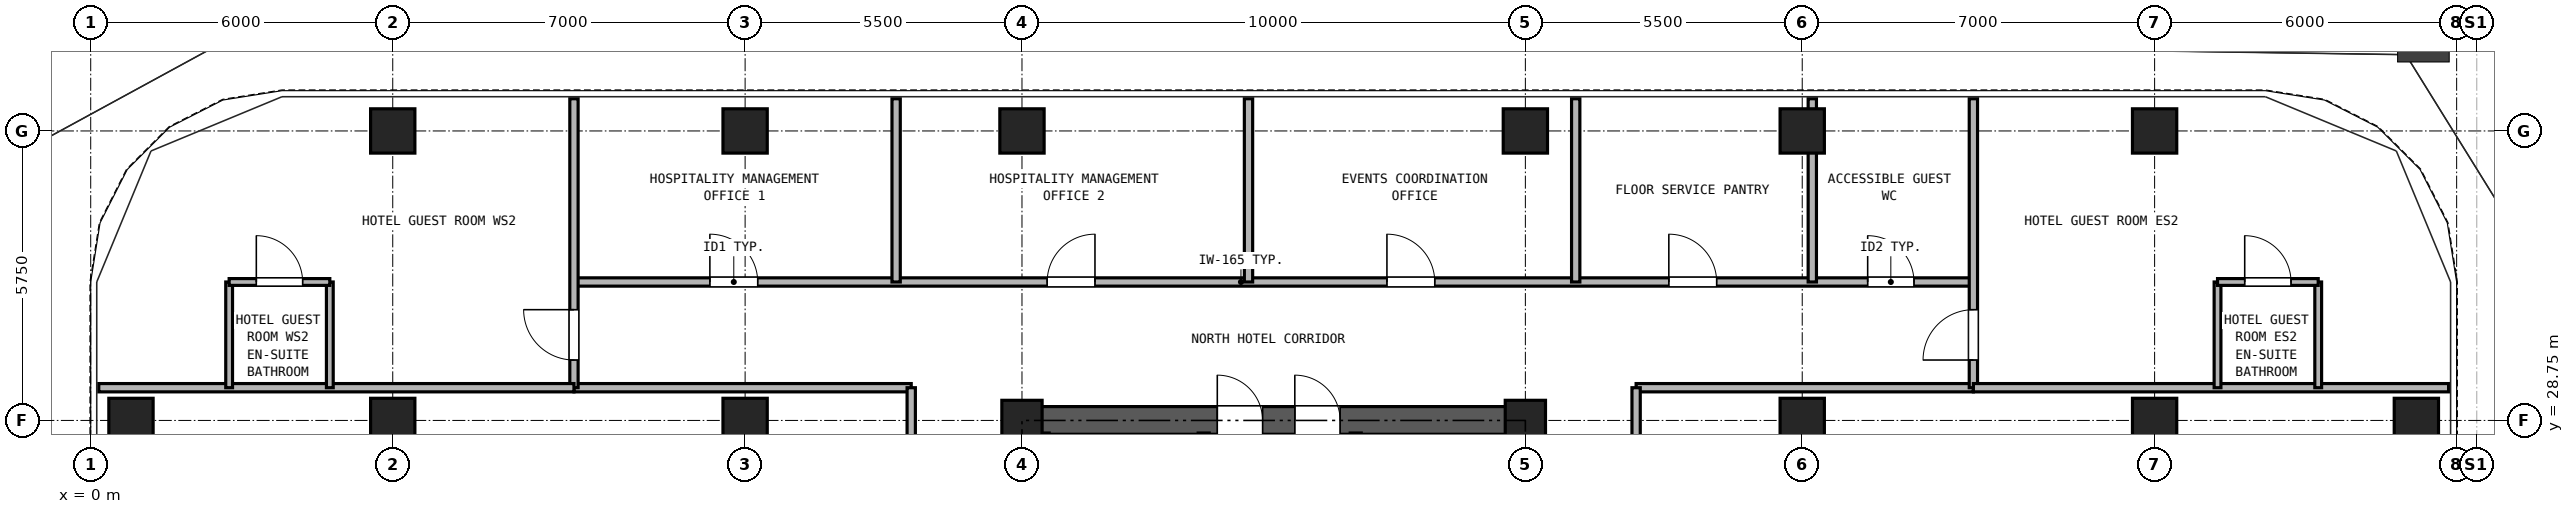
"""IFC4 building model, lengths in metres.
Left out: names, types, materials, properties, quantities, classifications, styles, units other than length and angle.
Written with IfcOpenShell. Run it as: python <this file> out.ifc"""

import sys

from ifc_helpers import new_model, si_unit, direction, frame, frame_2d, origin, origin_2d, place, context, subcontext, project, spatial, rectangle, hollow_rectangle, extrude, source, transform, mapped, element, fill, save


model = new_model("IFC4")
c1 = context("Model", 3, precision=1e-05, world=origin(), true_north=direction((0.0, 1.0)))
c2 = subcontext(c1, "Body", "Model", "MODEL_VIEW")
j1 = project(units=[si_unit("LENGTHUNIT", "METRE"), si_unit("PLANEANGLEUNIT", "RADIAN")], contexts=[c1])
p1 = place(None, origin())
s1 = spatial("IfcSite", under=j1, at=p1, CompositionType="ELEMENT")
p2 = place(p1, origin())
s2 = spatial("IfcBuilding", under=s1, at=p2, CompositionType="ELEMENT")
p3 = place(p2, frame((0.0, 0.0, 127.9)))
s3 = spatial("IfcBuildingStorey", under=s2, at=p3, CompositionType="ELEMENT", Elevation=127.9)
m1 = source(origin(), c2, "Body", "SweptSolid", [
    extrude(hollow_rectangle(XDim=0.88, YDim=0.88, WallThickness=0.05, at=origin_2d()), origin(), (0.0, 0.0, 1.0), 2.95),
])
for number, where, z_axis, x_axis in (
    (1, (6.0, 34.5, 0.0), (0.0, 0.0, 1.0), (1.0, 0.0, 0.0)),
    (2, (13.0, 34.5, 0.0), (0.0, 0.0, 1.0), (1.0, 0.0, 0.0)),
    (3, (18.5, 34.5, 0.0), (0.0, 0.0, 1.0), (1.0, 0.0, 0.0)),
    (4, (28.5, 34.5, 0.0), (0.0, 0.0, 1.0), (1.0, 0.0, 0.0)),
    (5, (34.0, 34.5, 0.0), (0.0, 0.0, 1.0), (1.0, 0.0, 0.0)),
    (6, (41.0, 34.5, 0.0), (0.0, 0.0, 1.0), (1.0, 0.0, 0.0)),
    (7, (0.8, 28.75, 0.0), (0.0, 0.0, 1.0), (1.0, 0.0, 0.0)),
    (8, (46.2, 28.75, 0.0), (0.0, 0.0, 1.0), (1.0, 0.0, 0.0)),
    (9, (6.0, 28.75, 0.0), (0.0, 0.0, 1.0), (1.0, 0.0, 0.0)),
    (10, (13.0, 28.75, 0.0), (0.0, 0.0, 1.0), (1.0, 0.0, 0.0)),
):
    element("IfcColumn", number, at=place(p3, frame(where, z_axis=z_axis, x_axis=x_axis)), inside=s3, PredefinedType="COLUMN", context=c2, shape_type="MappedRepresentation", body=[
        mapped(m1, transform((0.0, 0.0, 0.0), x_axis=(1.0, 0.0, 0.0), y_axis=(0.0, 1.0, 0.0), z_axis=(0.0, 0.0, 1.0), scale=1.0)),
    ])
m2 = source(origin(), c2, "Body", "SweptSolid", [
    extrude(hollow_rectangle(XDim=0.8, YDim=0.8, WallThickness=0.045, at=origin_2d()), origin(), (0.0, 0.0, 1.0), 2.95),
])
for number, where, z_axis, x_axis in (
    (11, (18.5, 28.75, 0.0), (0.0, 0.0, 1.0), (1.0, 0.0, 0.0)),
    (12, (28.5, 28.75, 0.0), (0.0, 0.0, 1.0), (1.0, 0.0, 0.0)),
):
    element("IfcColumn", number, at=place(p3, frame(where, z_axis=z_axis, x_axis=x_axis)), inside=s3, PredefinedType="COLUMN", context=c2, shape_type="MappedRepresentation", body=[
        mapped(m2, transform((0.0, 0.0, 0.0), x_axis=(1.0, 0.0, 0.0), y_axis=(0.0, 1.0, 0.0), z_axis=(0.0, 0.0, 1.0), scale=1.0)),
    ])
for number, where, z_axis, x_axis in (
    (13, (34.0, 28.75, 0.0), (0.0, 0.0, 1.0), (1.0, 0.0, 0.0)),
    (14, (41.0, 28.75, 0.0), (0.0, 0.0, 1.0), (1.0, 0.0, 0.0)),
):
    element("IfcColumn", number, at=place(p3, frame(where, z_axis=z_axis, x_axis=x_axis)), inside=s3, PredefinedType="COLUMN", context=c2, shape_type="MappedRepresentation", body=[
        mapped(m1, transform((0.0, 0.0, 0.0), x_axis=(1.0, 0.0, 0.0), y_axis=(0.0, 1.0, 0.0), z_axis=(0.0, 0.0, 1.0), scale=1.0)),
    ])
p4 = place(p3, frame((18.225, 28.75, 0.0), z_axis=(0.0, 0.0, 1.0), x_axis=(1.0, 0.0, 0.0)))
e15 = element("IfcWall", 15, at=p4, inside=s3, PredefinedType="SHEAR", context=c2, shape_type="SweptSolid", body=[
    extrude(rectangle(XDim=10.55, YDim=0.55, at=frame_2d((5.275, 0.0))), origin(), (0.0, 0.0, 1.0), 2.95),
])
p5 = place(p4, frame((4.155, 0.0, 0.0)))
e16 = element("IfcOpeningElement", 16, at=p5, cuts=e15, PredefinedType="OPENING", context=c2, shape_type="SweptSolid", body=[
    extrude(rectangle(XDim=0.9, YDim=2.05, at=frame_2d((0.45, 1.025))), frame((0.0, 0.285, 0.0), z_axis=(0.0, -1.0, 0.0), x_axis=(1.0, 0.0, 0.0)), (0.0, 0.0, 1.0), 0.57),
])
p6 = place(p4, frame((5.695, 0.0, 0.0)))
e17 = element("IfcOpeningElement", 17, at=p6, cuts=e15, PredefinedType="OPENING", context=c2, shape_type="SweptSolid", body=[
    extrude(rectangle(XDim=0.9, YDim=2.05, at=frame_2d((0.45, 1.025))), frame((0.0, 0.285, 0.0), z_axis=(0.0, -1.0, 0.0), x_axis=(1.0, 0.0, 0.0)), (0.0, 0.0, 1.0), 0.57),
])
for number, where, z_axis, x_axis in (
    (18, (18.93, 21.39, 0.0), (0.0, 0.0, 1.0), (0.0, 1.0, 0.0)),
    (19, (22.11, 21.39, 0.0), (0.0, 0.0, 1.0), (0.0, 1.0, 0.0)),
    (20, (25.13, 21.39, 0.0), (0.0, 0.0, 1.0), (0.0, 1.0, 0.0)),
):
    element("IfcWall", number, at=place(p3, frame(where, z_axis=z_axis, x_axis=x_axis)), inside=s3, PredefinedType="SOLIDWALL", context=c2, shape_type="SweptSolid", body=[
        extrude(rectangle(XDim=7.11, YDim=0.22, at=frame_2d((3.555, 0.0))), origin(), (0.0, 0.0, 1.0), 2.95),
    ])
p7 = place(p3, frame((9.6, 31.5, 0.0), z_axis=(0.0, 0.0, 1.0), x_axis=(1.0, 0.0, 0.0)))
e21 = element("IfcWall", 21, at=p7, inside=s3, PredefinedType="PARTITIONING", context=c2, shape_type="SweptSolid", body=[
    extrude(rectangle(XDim=27.8, YDim=0.165, at=frame_2d((13.9, 0.0))), origin(), (0.0, 0.0, 1.0), 2.583),
])
p8 = place(p7, frame((2.7, 0.0, 0.0)))
e22 = element("IfcOpeningElement", 22, at=p8, cuts=e21, PredefinedType="OPENING", context=c2, shape_type="SweptSolid", body=[
    extrude(rectangle(XDim=0.95, YDim=2.15, at=frame_2d((0.475, 1.075))), frame((0.0, 0.093, 0.0), z_axis=(0.0, -1.0, 0.0), x_axis=(1.0, 0.0, 0.0)), (0.0, 0.0, 1.0), 0.185),
])
p9 = place(p7, frame((9.4, 0.0, 0.0)))
e23 = element("IfcOpeningElement", 23, at=p9, cuts=e21, PredefinedType="OPENING", context=c2, shape_type="SweptSolid", body=[
    extrude(rectangle(XDim=0.95, YDim=2.15, at=frame_2d((0.475, 1.075))), frame((0.0, 0.093, 0.0), z_axis=(0.0, -1.0, 0.0), x_axis=(1.0, 0.0, 0.0)), (0.0, 0.0, 1.0), 0.185),
])
p10 = place(p7, frame((16.15, 0.0, 0.0)))
e24 = element("IfcOpeningElement", 24, at=p10, cuts=e21, PredefinedType="OPENING", context=c2, shape_type="SweptSolid", body=[
    extrude(rectangle(XDim=0.95, YDim=2.15, at=frame_2d((0.475, 1.075))), frame((0.0, 0.093, 0.0), z_axis=(0.0, -1.0, 0.0), x_axis=(1.0, 0.0, 0.0)), (0.0, 0.0, 1.0), 0.185),
])
p11 = place(p7, frame((21.75, 0.0, 0.0)))
e25 = element("IfcOpeningElement", 25, at=p11, cuts=e21, PredefinedType="OPENING", context=c2, shape_type="SweptSolid", body=[
    extrude(rectangle(XDim=0.95, YDim=2.15, at=frame_2d((0.475, 1.075))), frame((0.0, 0.093, 0.0), z_axis=(0.0, -1.0, 0.0), x_axis=(1.0, 0.0, 0.0)), (0.0, 0.0, 1.0), 0.185),
])
p12 = place(p7, frame((25.7, 0.0, 0.0)))
e26 = element("IfcOpeningElement", 26, at=p12, cuts=e21, PredefinedType="OPENING", context=c2, shape_type="SweptSolid", body=[
    extrude(rectangle(XDim=0.92, YDim=2.1, at=frame_2d((0.46, 1.05))), frame((0.0, 0.093, 0.0), z_axis=(0.0, -1.0, 0.0), x_axis=(1.0, 0.0, 0.0)), (0.0, 0.0, 1.0), 0.185),
])
for number, where, z_axis, x_axis in (
    (27, (9.6, 29.4, 0.0), (0.0, 0.0, 1.0), (1.0, 0.0, 0.0)),
    (28, (30.7, 29.4, 0.0), (0.0, 0.0, 1.0), (1.0, 0.0, 0.0)),
):
    element("IfcWall", number, at=place(p3, frame(where, z_axis=z_axis, x_axis=x_axis)), inside=s3, PredefinedType="PARTITIONING", context=c2, shape_type="SweptSolid", body=[
        extrude(rectangle(XDim=6.7, YDim=0.165, at=frame_2d((3.35, 0.0))), origin(), (0.0, 0.0, 1.0), 2.95),
    ])
p13 = place(p3, frame((16.3, 11.05, 0.0), z_axis=(0.0, 0.0, 1.0), x_axis=(0.0, 1.0, 0.0)))
e29 = element("IfcWall", 29, at=p13, inside=s3, PredefinedType="PARTITIONING", context=c2, shape_type="SweptSolid", body=[
    extrude(rectangle(XDim=18.35, YDim=0.165, at=frame_2d((9.175, 0.0))), origin(), (0.0, 0.0, 1.0), 2.95),
])
p14 = place(p13, frame((4.087, 0.0, 0.0)))
e30 = element("IfcOpeningElement", 30, at=p14, cuts=e29, PredefinedType="OPENING", context=c2, shape_type="SweptSolid", body=[
    extrude(rectangle(XDim=0.95, YDim=2.15, at=frame_2d((0.475, 1.075))), frame((0.0, 0.093, 0.0), z_axis=(0.0, -1.0, 0.0), x_axis=(1.0, 0.0, 0.0)), (0.0, 0.0, 1.0), 0.185),
])
p15 = place(p13, frame((13.262, 0.0, 0.0)))
e31 = element("IfcOpeningElement", 31, at=p15, cuts=e29, PredefinedType="OPENING", context=c2, shape_type="SweptSolid", body=[
    extrude(rectangle(XDim=0.95, YDim=2.15, at=frame_2d((0.475, 1.075))), frame((0.0, 0.093, 0.0), z_axis=(0.0, -1.0, 0.0), x_axis=(1.0, 0.0, 0.0)), (0.0, 0.0, 1.0), 0.185),
])
p16 = place(p3, frame((30.7, 11.05, 0.0), z_axis=(0.0, 0.0, 1.0), x_axis=(0.0, 1.0, 0.0)))
e32 = element("IfcWall", 32, at=p16, inside=s3, PredefinedType="PARTITIONING", context=c2, shape_type="SweptSolid", body=[
    extrude(rectangle(XDim=18.35, YDim=0.165, at=frame_2d((9.175, 0.0))), origin(), (0.0, 0.0, 1.0), 2.95),
])
p17 = place(p16, frame((8.675, 0.0, 0.0)))
e33 = element("IfcOpeningElement", 33, at=p17, cuts=e32, PredefinedType="OPENING", context=c2, shape_type="SweptSolid", body=[
    extrude(rectangle(XDim=0.95, YDim=2.15, at=frame_2d((0.475, 1.075))), frame((0.0, 0.093, 0.0), z_axis=(0.0, -1.0, 0.0), x_axis=(1.0, 0.0, 0.0)), (0.0, 0.0, 1.0), 0.185),
])
p18 = place(p3, frame((9.6, 29.4, 0.0), z_axis=(0.0, 0.0, 1.0), x_axis=(0.0, 1.0, 0.0)))
e34 = element("IfcWall", 34, at=p18, inside=s3, PredefinedType="PARTITIONING", context=c2, shape_type="SweptSolid", body=[
    extrude(rectangle(XDim=5.74, YDim=0.165, at=frame_2d((2.87, 0.0))), origin(), (0.0, 0.0, 1.0), 2.95),
])
p19 = place(p18, frame((0.55, 0.0, 0.0)))
e35 = element("IfcOpeningElement", 35, at=p19, cuts=e34, PredefinedType="OPENING", context=c2, shape_type="SweptSolid", body=[
    extrude(rectangle(XDim=1.0, YDim=2.15, at=frame_2d((0.5, 1.075))), frame((0.0, 0.093, 0.0), z_axis=(0.0, -1.0, 0.0), x_axis=(1.0, 0.0, 0.0)), (0.0, 0.0, 1.0), 0.185),
])
p20 = place(p3, frame((37.4, 29.4, 0.0), z_axis=(0.0, 0.0, 1.0), x_axis=(0.0, 1.0, 0.0)))
e36 = element("IfcWall", 36, at=p20, inside=s3, PredefinedType="PARTITIONING", context=c2, shape_type="SweptSolid", body=[
    extrude(rectangle(XDim=5.74, YDim=0.165, at=frame_2d((2.87, 0.0))), origin(), (0.0, 0.0, 1.0), 2.95),
])
p21 = place(p20, frame((0.55, 0.0, 0.0)))
e37 = element("IfcOpeningElement", 37, at=p21, cuts=e36, PredefinedType="OPENING", context=c2, shape_type="SweptSolid", body=[
    extrude(rectangle(XDim=1.0, YDim=2.15, at=frame_2d((0.5, 1.075))), frame((0.0, 0.093, 0.0), z_axis=(0.0, -1.0, 0.0), x_axis=(1.0, 0.0, 0.0)), (0.0, 0.0, 1.0), 0.185),
])
for number, where, z_axis, x_axis in (
    (38, (0.16, 29.4, 0.0), (0.0, 0.0, 1.0), (1.0, 0.0, 0.0)),
    (39, (37.4, 29.4, 0.0), (0.0, 0.0, 1.0), (1.0, 0.0, 0.0)),
):
    element("IfcWall", number, at=place(p3, frame(where, z_axis=z_axis, x_axis=x_axis)), inside=s3, PredefinedType="PARTITIONING", context=c2, shape_type="SweptSolid", body=[
        extrude(rectangle(XDim=9.44, YDim=0.165, at=frame_2d((4.72, 0.0))), origin(), (0.0, 0.0, 1.0), 2.95),
    ])
for number, where, z_axis, x_axis in (
    (40, (2.75, 29.4, 0.0), (0.0, 0.0, 1.0), (0.0, 1.0, 0.0)),
    (41, (4.75, 29.4, 0.0), (0.0, 0.0, 1.0), (0.0, 1.0, 0.0)),
):
    element("IfcWall", number, at=place(p3, frame(where, z_axis=z_axis, x_axis=x_axis)), inside=s3, PredefinedType="PARTITIONING", context=c2, shape_type="SweptSolid", body=[
        extrude(rectangle(XDim=2.1, YDim=0.135, at=frame_2d((1.05, 0.0))), origin(), (0.0, 0.0, 1.0), 2.95),
    ])
p22 = place(p3, frame((2.75, 31.5, 0.0), z_axis=(0.0, 0.0, 1.0), x_axis=(1.0, 0.0, 0.0)))
e42 = element("IfcWall", 42, at=p22, inside=s3, PredefinedType="PARTITIONING", context=c2, shape_type="SweptSolid", body=[
    extrude(rectangle(XDim=2.0, YDim=0.135, at=frame_2d((1.0, 0.0))), origin(), (0.0, 0.0, 1.0), 2.95),
])
p23 = place(p22, frame((0.54, 0.0, 0.0)))
e43 = element("IfcOpeningElement", 43, at=p23, cuts=e42, PredefinedType="OPENING", context=c2, shape_type="SweptSolid", body=[
    extrude(rectangle(XDim=0.92, YDim=2.1, at=frame_2d((0.46, 1.05))), frame((0.0, 0.077, 0.0), z_axis=(0.0, -1.0, 0.0), x_axis=(1.0, 0.0, 0.0)), (0.0, 0.0, 1.0), 0.155),
])
for number, where, z_axis, x_axis in (
    (44, (42.25, 29.4, 0.0), (0.0, 0.0, 1.0), (0.0, 1.0, 0.0)),
    (45, (44.25, 29.4, 0.0), (0.0, 0.0, 1.0), (0.0, 1.0, 0.0)),
):
    element("IfcWall", number, at=place(p3, frame(where, z_axis=z_axis, x_axis=x_axis)), inside=s3, PredefinedType="PARTITIONING", context=c2, shape_type="SweptSolid", body=[
        extrude(rectangle(XDim=2.1, YDim=0.135, at=frame_2d((1.05, 0.0))), origin(), (0.0, 0.0, 1.0), 2.95),
    ])
p24 = place(p3, frame((42.25, 31.5, 0.0), z_axis=(0.0, 0.0, 1.0), x_axis=(1.0, 0.0, 0.0)))
e46 = element("IfcWall", 46, at=p24, inside=s3, PredefinedType="PARTITIONING", context=c2, shape_type="SweptSolid", body=[
    extrude(rectangle(XDim=2.0, YDim=0.135, at=frame_2d((1.0, 0.0))), origin(), (0.0, 0.0, 1.0), 2.95),
])
p25 = place(p24, frame((0.54, 0.0, 0.0)))
e47 = element("IfcOpeningElement", 47, at=p25, cuts=e46, PredefinedType="OPENING", context=c2, shape_type="SweptSolid", body=[
    extrude(rectangle(XDim=0.92, YDim=2.1, at=frame_2d((0.46, 1.05))), frame((0.0, 0.077, 0.0), z_axis=(0.0, -1.0, 0.0), x_axis=(1.0, 0.0, 0.0)), (0.0, 0.0, 1.0), 0.155),
])
for number, where, z_axis, x_axis in (
    (48, (16.0, 31.5, 0.0), (0.0, 0.0, 1.0), (0.0, 1.0, 0.0)),
    (49, (23.0, 31.5, 0.0), (0.0, 0.0, 1.0), (0.0, 1.0, 0.0)),
    (50, (29.5, 31.5, 0.0), (0.0, 0.0, 1.0), (0.0, 1.0, 0.0)),
):
    element("IfcWall", number, at=place(p3, frame(where, z_axis=z_axis, x_axis=x_axis)), inside=s3, PredefinedType="PARTITIONING", context=c2, shape_type="SweptSolid", body=[
        extrude(rectangle(XDim=3.64, YDim=0.165, at=frame_2d((1.82, 0.0))), origin(), (0.0, 0.0, 1.0), 2.95),
    ])
p26 = place(p3, frame((34.2, 31.5, 0.0), z_axis=(0.0, 0.0, 1.0), x_axis=(0.0, 1.0, 0.0)))
e51 = element("IfcWall", 51, at=p26, inside=s3, PredefinedType="PARTITIONING", context=c2, shape_type="SweptSolid", body=[
    extrude(rectangle(XDim=3.64, YDim=0.165, at=frame_2d((1.82, 0.0))), origin(), (0.0, 0.0, 1.0), 2.247),
])
p27 = place(p5, origin())
e52 = element("IfcDoor", 52, at=p27, inside=s3, OperationType="SINGLE_SWING_LEFT", PredefinedType="DOOR", context=c2, shape_type="SweptSolid", body=[
    extrude(rectangle(XDim=0.9, YDim=2.05, at=frame_2d((0.45, 1.025))), frame((0.0, 0.025, 0.0), z_axis=(0.0, -1.0, 0.0), x_axis=(1.0, 0.0, 0.0)), (0.0, 0.0, 1.0), 0.05),
])
fill(e16, e52)
p28 = place(p6, origin())
e53 = element("IfcDoor", 53, at=p28, inside=s3, OperationType="SINGLE_SWING_LEFT", PredefinedType="DOOR", context=c2, shape_type="SweptSolid", body=[
    extrude(rectangle(XDim=0.9, YDim=2.05, at=frame_2d((0.45, 1.025))), frame((0.0, 0.025, 0.0), z_axis=(0.0, -1.0, 0.0), x_axis=(1.0, 0.0, 0.0)), (0.0, 0.0, 1.0), 0.05),
])
fill(e17, e53)
p29 = place(p23, frame((0.92, 0.0, 0.0), z_axis=(0.0, 0.0, 1.0), x_axis=(-1.0, 0.0, 0.0)))
e54 = element("IfcDoor", 54, at=p29, inside=s3, OperationType="SINGLE_SWING_LEFT", PredefinedType="DOOR", context=c2, shape_type="SweptSolid", body=[
    extrude(rectangle(XDim=0.92, YDim=2.1, at=frame_2d((0.46, 1.05))), frame((0.0, 0.025, 0.0), z_axis=(0.0, -1.0, 0.0), x_axis=(1.0, 0.0, 0.0)), (0.0, 0.0, 1.0), 0.05),
])
fill(e43, e54)
p30 = place(p19, origin())
e55 = element("IfcDoor", 55, at=p30, inside=s3, OperationType="SINGLE_SWING_RIGHT", PredefinedType="DOOR", context=c2, shape_type="SweptSolid", body=[
    extrude(rectangle(XDim=1.0, YDim=2.15, at=frame_2d((0.5, 1.075))), frame((0.0, 0.025, 0.0), z_axis=(0.0, -1.0, 0.0), x_axis=(1.0, 0.0, 0.0)), (0.0, 0.0, 1.0), 0.05),
])
fill(e35, e55)
p31 = place(p25, frame((0.92, 0.0, 0.0), z_axis=(0.0, 0.0, 1.0), x_axis=(-1.0, 0.0, 0.0)))
e56 = element("IfcDoor", 56, at=p31, inside=s3, OperationType="SINGLE_SWING_LEFT", PredefinedType="DOOR", context=c2, shape_type="SweptSolid", body=[
    extrude(rectangle(XDim=0.92, YDim=2.1, at=frame_2d((0.46, 1.05))), frame((0.0, 0.025, 0.0), z_axis=(0.0, -1.0, 0.0), x_axis=(1.0, 0.0, 0.0)), (0.0, 0.0, 1.0), 0.05),
])
fill(e47, e56)
p32 = place(p21, frame((1.0, 0.0, 0.0), z_axis=(0.0, 0.0, 1.0), x_axis=(-1.0, 0.0, 0.0)))
e57 = element("IfcDoor", 57, at=p32, inside=s3, OperationType="SINGLE_SWING_LEFT", PredefinedType="DOOR", context=c2, shape_type="SweptSolid", body=[
    extrude(rectangle(XDim=1.0, YDim=2.15, at=frame_2d((0.5, 1.075))), frame((0.0, 0.025, 0.0), z_axis=(0.0, -1.0, 0.0), x_axis=(1.0, 0.0, 0.0)), (0.0, 0.0, 1.0), 0.05),
])
fill(e37, e57)
p33 = place(p8, origin())
e58 = element("IfcDoor", 58, at=p33, inside=s3, OperationType="SINGLE_SWING_LEFT", PredefinedType="DOOR", context=c2, shape_type="SweptSolid", body=[
    extrude(rectangle(XDim=0.95, YDim=2.15, at=frame_2d((0.475, 1.075))), frame((0.0, 0.025, 0.0), z_axis=(0.0, -1.0, 0.0), x_axis=(1.0, 0.0, 0.0)), (0.0, 0.0, 1.0), 0.05),
])
fill(e22, e58)
p34 = place(p9, origin())
e59 = element("IfcDoor", 59, at=p34, inside=s3, OperationType="SINGLE_SWING_RIGHT", PredefinedType="DOOR", context=c2, shape_type="SweptSolid", body=[
    extrude(rectangle(XDim=0.95, YDim=2.15, at=frame_2d((0.475, 1.075))), frame((0.0, 0.025, 0.0), z_axis=(0.0, -1.0, 0.0), x_axis=(1.0, 0.0, 0.0)), (0.0, 0.0, 1.0), 0.05),
])
fill(e23, e59)
p35 = place(p10, origin())
e60 = element("IfcDoor", 60, at=p35, inside=s3, OperationType="SINGLE_SWING_LEFT", PredefinedType="DOOR", context=c2, shape_type="SweptSolid", body=[
    extrude(rectangle(XDim=0.95, YDim=2.15, at=frame_2d((0.475, 1.075))), frame((0.0, 0.025, 0.0), z_axis=(0.0, -1.0, 0.0), x_axis=(1.0, 0.0, 0.0)), (0.0, 0.0, 1.0), 0.05),
])
fill(e24, e60)
p36 = place(p11, origin())
e61 = element("IfcDoor", 61, at=p36, inside=s3, OperationType="SINGLE_SWING_LEFT", PredefinedType="DOOR", context=c2, shape_type="SweptSolid", body=[
    extrude(rectangle(XDim=0.95, YDim=2.15, at=frame_2d((0.475, 1.075))), frame((0.0, 0.025, 0.0), z_axis=(0.0, -1.0, 0.0), x_axis=(1.0, 0.0, 0.0)), (0.0, 0.0, 1.0), 0.05),
])
fill(e25, e61)
p37 = place(p12, origin())
e62 = element("IfcDoor", 62, at=p37, inside=s3, OperationType="SINGLE_SWING_LEFT", PredefinedType="DOOR", context=c2, shape_type="SweptSolid", body=[
    extrude(rectangle(XDim=0.92, YDim=2.1, at=frame_2d((0.46, 1.05))), frame((0.0, 0.025, 0.0), z_axis=(0.0, -1.0, 0.0), x_axis=(1.0, 0.0, 0.0)), (0.0, 0.0, 1.0), 0.05),
])
fill(e26, e62)
save(model, sys.argv[1])
